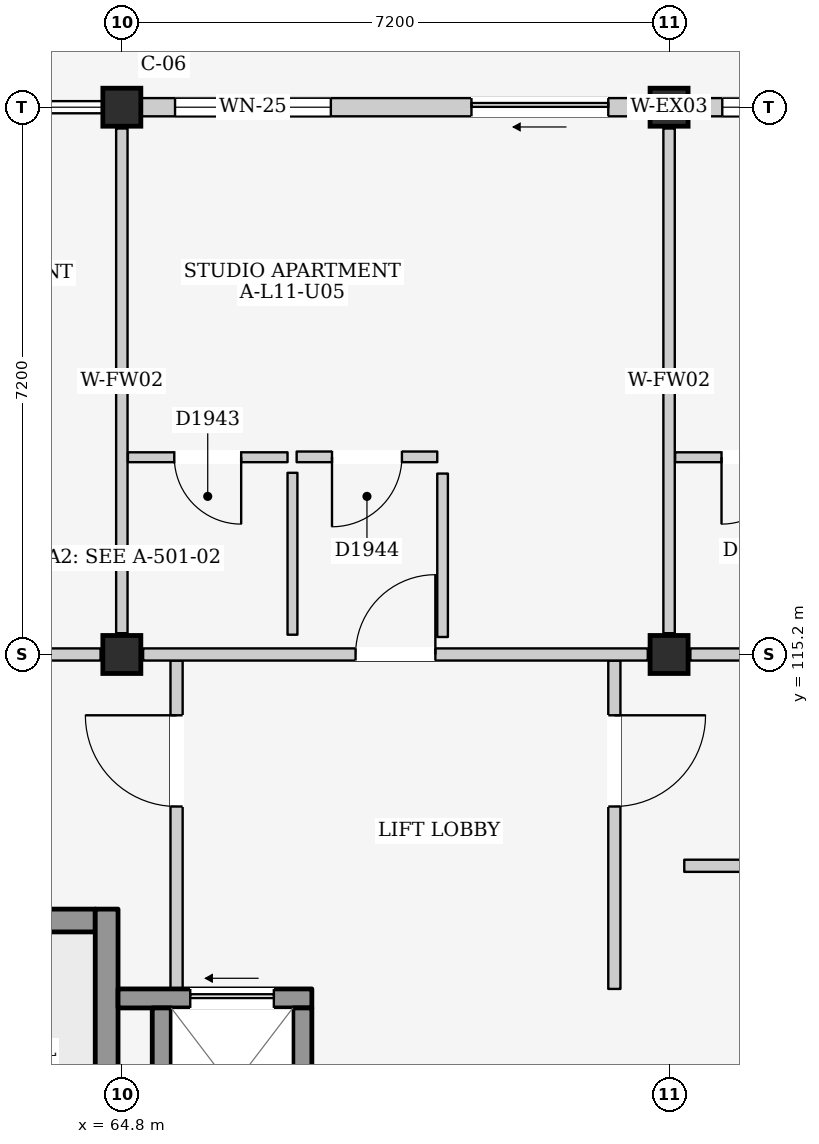
"""IFC4 building model, lengths in metres.
Left out: names, types, materials, properties, quantities, classifications, styles, units other than length and angle.
Written with IfcOpenShell. Run it as: python <this file> out.ifc"""

import sys

from ifc_helpers import new_model, si_unit, direction, frame, frame_2d, origin, origin_2d, place, context, subcontext, project, spatial, rectangle, extrude, element, fill, save


model = new_model("IFC4")
c1 = context("Model", 3, precision=1e-05, world=origin(), true_north=direction((0.0, 1.0)))
c2 = subcontext(c1, "Body", "Model", "MODEL_VIEW")
j1 = project(units=[si_unit("LENGTHUNIT", "METRE"), si_unit("PLANEANGLEUNIT", "RADIAN")], contexts=[c1])
p1 = place(None, origin())
s1 = spatial("IfcSite", under=j1, at=p1, CompositionType="ELEMENT")
p2 = place(p1, origin())
s2 = spatial("IfcBuilding", under=s1, at=p2, CompositionType="ELEMENT")
p3 = place(p2, frame((0.0, 0.0, 38.0)))
s3 = spatial("IfcBuildingStorey", under=s2, at=p3, CompositionType="ELEMENT", Elevation=38.0)
for number, where, z_axis, x_axis in (
    (1, (64.8, 115.2, 0.0), (0.0, 0.0, 1.0), (1.0, 0.0, 0.0)),
    (2, (64.8, 122.4, 0.0), (0.0, 0.0, 1.0), (1.0, 0.0, 0.0)),
    (3, (72.0, 115.2, 0.0), (0.0, 0.0, 1.0), (1.0, 0.0, 0.0)),
    (4, (72.0, 122.4, 0.0), (0.0, 0.0, 1.0), (1.0, 0.0, 0.0)),
):
    element("IfcColumn", number, at=place(p3, frame(where, z_axis=z_axis, x_axis=x_axis)), inside=s3, PredefinedType="COLUMN", context=c2, shape_type="SweptSolid", body=[
        extrude(rectangle(XDim=0.5, YDim=0.5, at=origin_2d()), origin(), (0.0, 0.0, 1.0), 3.2),
    ])
p4 = place(p3, frame((65.05, 122.4, 0.0), z_axis=(0.0, 0.0, 1.0), x_axis=(1.0, 0.0, 0.0)))
e5 = element("IfcWall", 5, at=p4, inside=s3, PredefinedType="ELEMENTEDWALL", context=c2, shape_type="SweptSolid", body=[
    extrude(rectangle(XDim=6.7, YDim=0.24, at=frame_2d((3.35, 0.0))), origin(), (0.0, 0.0, 1.0), 2.525),
])
p5 = place(p4, frame((4.35, 0.0, 0.0)))
e6 = element("IfcOpeningElement", 6, at=p5, cuts=e5, PredefinedType="OPENING", context=c2, shape_type="SweptSolid", body=[
    extrude(rectangle(XDim=1.8, YDim=2.12, at=frame_2d((0.9, 1.06))), frame((0.0, 0.135, 0.0), z_axis=(0.0, -1.0, 0.0), x_axis=(1.0, 0.0, 0.0)), (0.0, 0.0, 1.0), 0.27),
])
p6 = place(p4, frame((0.45, 0.0, 0.815)))
e7 = element("IfcOpeningElement", 7, at=p6, cuts=e5, PredefinedType="OPENING", context=c2, shape_type="SweptSolid", body=[
    extrude(rectangle(XDim=2.05, YDim=1.6, at=frame_2d((1.025, 0.8))), frame((0.0, 0.135, 0.0), z_axis=(0.0, -1.0, 0.0), x_axis=(1.0, 0.0, 0.0)), (0.0, 0.0, 1.0), 0.27),
])
p7 = place(p3, frame((72.25, 122.4, 0.0), z_axis=(0.0, 0.0, 1.0), x_axis=(1.0, 0.0, 0.0)))
e8 = element("IfcWall", 8, at=p7, inside=s3, PredefinedType="ELEMENTEDWALL", context=c2, shape_type="SweptSolid", body=[
    extrude(rectangle(XDim=6.7, YDim=0.24, at=frame_2d((3.35, 0.0))), origin(), (0.0, 0.0, 1.0), 2.525),
])
p8 = place(p7, frame((4.55, 0.0, 0.0)))
e9 = element("IfcOpeningElement", 9, at=p8, cuts=e8, PredefinedType="OPENING", context=c2, shape_type="SweptSolid", body=[
    extrude(rectangle(XDim=1.6, YDim=2.12, at=frame_2d((0.8, 1.06))), frame((0.0, 0.135, 0.0), z_axis=(0.0, -1.0, 0.0), x_axis=(1.0, 0.0, 0.0)), (0.0, 0.0, 1.0), 0.27),
])
p9 = place(p7, frame((0.45, 0.0, 0.865)))
e10 = element("IfcOpeningElement", 10, at=p9, cuts=e8, PredefinedType="OPENING", context=c2, shape_type="SweptSolid", body=[
    extrude(rectangle(XDim=1.75, YDim=1.55, at=frame_2d((0.875, 0.775))), frame((0.0, 0.135, 0.0), z_axis=(0.0, -1.0, 0.0), x_axis=(1.0, 0.0, 0.0)), (0.0, 0.0, 1.0), 0.27),
])
p10 = place(p3, frame((57.95, 111.7, 0.0), z_axis=(0.0, 0.0, 1.0), x_axis=(1.0, 0.0, 0.0)))
e11 = element("IfcWall", 11, at=p10, inside=s3, PredefinedType="SHEAR", context=c2, shape_type="SweptSolid", body=[
    extrude(rectangle(XDim=6.5, YDim=0.3, at=frame_2d((3.25, 0.0))), origin(), (0.0, 0.0, 1.0), 2.99),
])
p11 = place(p10, frame((0.18, 0.0, 0.0)))
e12 = element("IfcOpeningElement", 12, at=p11, cuts=e11, PredefinedType="OPENING", context=c2, shape_type="SweptSolid", body=[
    extrude(rectangle(XDim=1.15, YDim=2.2, at=frame_2d((0.575, 1.1))), frame((0.0, 0.165, 0.0), z_axis=(0.0, -1.0, 0.0), x_axis=(1.0, 0.0, 0.0)), (0.0, 0.0, 1.0), 0.33),
])
p12 = place(p3, frame((64.6, 108.15, 0.0), z_axis=(0.0, 0.0, 1.0), x_axis=(0.0, 1.0, 0.0)))
e13 = element("IfcWall", 13, at=p12, inside=s3, PredefinedType="SHEAR", context=c2, shape_type="SweptSolid", body=[
    extrude(rectangle(XDim=3.7, YDim=0.3, at=frame_2d((1.85, 0.0))), origin(), (0.0, 0.0, 1.0), 2.99),
])
p13 = place(p3, frame((65.52, 110.8, 0.0), z_axis=(0.0, 0.0, 1.0), x_axis=(0.0, 1.0, 0.0)))
e14 = element("IfcWall", 14, at=p13, inside=s3, PredefinedType="PARTITIONING", context=c2, shape_type="SweptSolid", body=[
    extrude(rectangle(XDim=4.32, YDim=0.16, at=frame_2d((2.16, 0.0))), origin(), (0.0, 0.0, 1.0), 2.99),
])
p14 = place(p13, frame((2.4, 0.0, 0.0)))
e15 = element("IfcOpeningElement", 15, at=p14, cuts=e14, PredefinedType="OPENING", context=c2, shape_type="SweptSolid", body=[
    extrude(rectangle(XDim=1.2, YDim=2.2, at=frame_2d((0.6, 1.1))), frame((0.0, 0.095, 0.0), z_axis=(0.0, -1.0, 0.0), x_axis=(1.0, 0.0, 0.0)), (0.0, 0.0, 1.0), 0.19),
])
p15 = place(p3, frame((71.28, 110.8, 0.0), z_axis=(0.0, 0.0, 1.0), x_axis=(0.0, 1.0, 0.0)))
e16 = element("IfcWall", 16, at=p15, inside=s3, PredefinedType="PARTITIONING", context=c2, shape_type="SweptSolid", body=[
    extrude(rectangle(XDim=4.32, YDim=0.16, at=frame_2d((2.16, 0.0))), origin(), (0.0, 0.0, 1.0), 2.99),
])
p16 = place(p15, frame((2.4, 0.0, 0.0)))
e17 = element("IfcOpeningElement", 17, at=p16, cuts=e16, PredefinedType="OPENING", context=c2, shape_type="SweptSolid", body=[
    extrude(rectangle(XDim=1.2, YDim=2.2, at=frame_2d((0.6, 1.1))), frame((0.0, 0.095, 0.0), z_axis=(0.0, -1.0, 0.0), x_axis=(1.0, 0.0, 0.0)), (0.0, 0.0, 1.0), 0.19),
])
p17 = place(p3, frame((64.75, 110.675, 0.0), z_axis=(0.0, 0.0, 1.0), x_axis=(1.0, 0.0, 0.0)))
e18 = element("IfcWall", 18, at=p17, inside=s3, PredefinedType="SHEAR", context=c2, shape_type="SweptSolid", body=[
    extrude(rectangle(XDim=2.55, YDim=0.25, at=frame_2d((1.275, 0.0))), origin(), (0.0, 0.0, 1.0), 2.99),
])
p18 = place(p17, frame((0.95, 0.0, 0.0)))
e19 = element("IfcOpeningElement", 19, at=p18, cuts=e18, PredefinedType="OPENING", context=c2, shape_type="SweptSolid", body=[
    extrude(rectangle(XDim=1.1, YDim=2.15, at=frame_2d((0.55, 1.075))), frame((0.0, 0.14, 0.0), z_axis=(0.0, -1.0, 0.0), x_axis=(1.0, 0.0, 0.0)), (0.0, 0.0, 1.0), 0.28),
])
for number, where, z_axis, x_axis in (
    (20, (65.325, 108.45, 0.0), (0.0, 0.0, 1.0), (0.0, 1.0, 0.0)),
    (21, (67.175, 108.45, 0.0), (0.0, 0.0, 1.0), (0.0, 1.0, 0.0)),
):
    element("IfcWall", number, at=place(p3, frame(where, z_axis=z_axis, x_axis=x_axis)), inside=s3, PredefinedType="SHEAR", context=c2, shape_type="SweptSolid", body=[
        extrude(rectangle(XDim=2.1, YDim=0.25, at=frame_2d((1.05, 0.0))), origin(), (0.0, 0.0, 1.0), 2.99),
    ])
p19 = place(p3, frame((57.88, 115.2, 0.0), z_axis=(0.0, 0.0, 1.0), x_axis=(1.0, 0.0, 0.0)))
e22 = element("IfcWall", 22, at=p19, inside=s3, PredefinedType="PARTITIONING", context=c2, shape_type="SweptSolid", body=[
    extrude(rectangle(XDim=6.64, YDim=0.16, at=frame_2d((3.32, 0.0))), origin(), (0.0, 0.0, 1.0), 2.325),
])
p20 = place(p19, frame((2.795, 0.0, 0.0)))
e23 = element("IfcOpeningElement", 23, at=p20, cuts=e22, PredefinedType="OPENING", context=c2, shape_type="SweptSolid", body=[
    extrude(rectangle(XDim=1.05, YDim=2.15, at=frame_2d((0.525, 1.075))), frame((0.0, 0.095, 0.0), z_axis=(0.0, -1.0, 0.0), x_axis=(1.0, 0.0, 0.0)), (0.0, 0.0, 1.0), 0.19),
])
p21 = place(p3, frame((64.8, 115.48, 0.0), z_axis=(0.0, 0.0, 1.0), x_axis=(0.0, 1.0, 0.0)))
e24 = element("IfcWall", 24, at=p21, inside=s3, PredefinedType="PARTITIONING", context=c2, shape_type="SweptSolid", body=[
    extrude(rectangle(XDim=6.64, YDim=0.15, at=frame_2d((3.32, 0.0))), origin(), (0.0, 0.0, 1.0), 2.475),
])
p22 = place(p3, frame((65.08, 115.2, 0.0), z_axis=(0.0, 0.0, 1.0), x_axis=(1.0, 0.0, 0.0)))
e25 = element("IfcWall", 25, at=p22, inside=s3, PredefinedType="PARTITIONING", context=c2, shape_type="SweptSolid", body=[
    extrude(rectangle(XDim=6.64, YDim=0.16, at=frame_2d((3.32, 0.0))), origin(), (0.0, 0.0, 1.0), 2.325),
])
p23 = place(p22, frame((2.795, 0.0, 0.0)))
e26 = element("IfcOpeningElement", 26, at=p23, cuts=e25, PredefinedType="OPENING", context=c2, shape_type="SweptSolid", body=[
    extrude(rectangle(XDim=1.05, YDim=2.15, at=frame_2d((0.525, 1.075))), frame((0.0, 0.095, 0.0), z_axis=(0.0, -1.0, 0.0), x_axis=(1.0, 0.0, 0.0)), (0.0, 0.0, 1.0), 0.19),
])
p24 = place(p3, frame((72.0, 115.48, 0.0), z_axis=(0.0, 0.0, 1.0), x_axis=(0.0, 1.0, 0.0)))
e27 = element("IfcWall", 27, at=p24, inside=s3, PredefinedType="PARTITIONING", context=c2, shape_type="SweptSolid", body=[
    extrude(rectangle(XDim=6.64, YDim=0.15, at=frame_2d((3.32, 0.0))), origin(), (0.0, 0.0, 1.0), 2.475),
])
p25 = place(p3, frame((64.88, 117.795, 0.0), z_axis=(0.0, 0.0, 1.0), x_axis=(1.0, 0.0, 0.0)))
e28 = element("IfcWall", 28, at=p25, inside=s3, PredefinedType="PARTITIONING", context=c2, shape_type="SweptSolid", body=[
    extrude(rectangle(XDim=2.1, YDim=0.13, at=frame_2d((1.05, 0.0))), origin(), (0.0, 0.0, 1.0), 2.99),
])
p26 = place(p25, frame((0.61, 0.0, 0.0)))
e29 = element("IfcOpeningElement", 29, at=p26, cuts=e28, PredefinedType="OPENING", context=c2, shape_type="SweptSolid", body=[
    extrude(rectangle(XDim=0.88, YDim=2.1, at=frame_2d((0.44, 1.05))), frame((0.0, 0.08, 0.0), z_axis=(0.0, -1.0, 0.0), x_axis=(1.0, 0.0, 0.0)), (0.0, 0.0, 1.0), 0.16),
])
p27 = place(p3, frame((67.045, 115.46, 0.0), z_axis=(0.0, 0.0, 1.0), x_axis=(0.0, 1.0, 0.0)))
e30 = element("IfcWall", 30, at=p27, inside=s3, PredefinedType="PARTITIONING", context=c2, shape_type="SweptSolid", body=[
    extrude(rectangle(XDim=2.13, YDim=0.13, at=frame_2d((1.065, 0.0))), origin(), (0.0, 0.0, 1.0), 2.99),
])
p28 = place(p3, frame((67.1, 117.8, 0.0), z_axis=(0.0, 0.0, 1.0), x_axis=(1.0, 0.0, 0.0)))
e31 = element("IfcWall", 31, at=p28, inside=s3, PredefinedType="PARTITIONING", context=c2, shape_type="SweptSolid", body=[
    extrude(rectangle(XDim=1.85, YDim=0.14, at=frame_2d((0.925, 0.0))), origin(), (0.0, 0.0, 1.0), 2.99),
])
p29 = place(p28, frame((0.465, 0.0, 0.0)))
e32 = element("IfcOpeningElement", 32, at=p29, cuts=e31, PredefinedType="OPENING", context=c2, shape_type="SweptSolid", body=[
    extrude(rectangle(XDim=0.92, YDim=2.1, at=frame_2d((0.46, 1.05))), frame((0.0, 0.085, 0.0), z_axis=(0.0, -1.0, 0.0), x_axis=(1.0, 0.0, 0.0)), (0.0, 0.0, 1.0), 0.17),
])
p30 = place(p3, frame((69.02, 115.43, 0.0), z_axis=(0.0, 0.0, 1.0), x_axis=(0.0, 1.0, 0.0)))
e33 = element("IfcWall", 33, at=p30, inside=s3, PredefinedType="PARTITIONING", context=c2, shape_type="SweptSolid", body=[
    extrude(rectangle(XDim=2.15, YDim=0.14, at=frame_2d((1.075, 0.0))), origin(), (0.0, 0.0, 1.0), 2.99),
])
p31 = place(p3, frame((72.28, 115.2, 0.0), z_axis=(0.0, 0.0, 1.0), x_axis=(1.0, 0.0, 0.0)))
e34 = element("IfcWall", 34, at=p31, inside=s3, PredefinedType="PARTITIONING", context=c2, shape_type="SweptSolid", body=[
    extrude(rectangle(XDim=6.64, YDim=0.16, at=frame_2d((3.32, 0.0))), origin(), (0.0, 0.0, 1.0), 2.325),
])
p32 = place(p31, frame((2.795, 0.0, 0.0)))
e35 = element("IfcOpeningElement", 35, at=p32, cuts=e34, PredefinedType="OPENING", context=c2, shape_type="SweptSolid", body=[
    extrude(rectangle(XDim=1.05, YDim=2.15, at=frame_2d((0.525, 1.075))), frame((0.0, 0.095, 0.0), z_axis=(0.0, -1.0, 0.0), x_axis=(1.0, 0.0, 0.0)), (0.0, 0.0, 1.0), 0.19),
])
p33 = place(p3, frame((72.08, 117.795, 0.0), z_axis=(0.0, 0.0, 1.0), x_axis=(1.0, 0.0, 0.0)))
e36 = element("IfcWall", 36, at=p33, inside=s3, PredefinedType="PARTITIONING", context=c2, shape_type="SweptSolid", body=[
    extrude(rectangle(XDim=2.1, YDim=0.13, at=frame_2d((1.05, 0.0))), origin(), (0.0, 0.0, 1.0), 2.99),
])
p34 = place(p33, frame((0.61, 0.0, 0.0)))
e37 = element("IfcOpeningElement", 37, at=p34, cuts=e36, PredefinedType="OPENING", context=c2, shape_type="SweptSolid", body=[
    extrude(rectangle(XDim=0.88, YDim=2.1, at=frame_2d((0.44, 1.05))), frame((0.0, 0.08, 0.0), z_axis=(0.0, -1.0, 0.0), x_axis=(1.0, 0.0, 0.0)), (0.0, 0.0, 1.0), 0.16),
])
p35 = place(p3, frame((72.2, 112.42, 0.0), z_axis=(0.0, 0.0, 1.0), x_axis=(1.0, 0.0, 0.0)))
e38 = element("IfcWall", 38, at=p35, inside=s3, PredefinedType="PARTITIONING", context=c2, shape_type="SweptSolid", body=[
    extrude(rectangle(XDim=6.8, YDim=0.16, at=frame_2d((3.4, 0.0))), origin(), (0.0, 0.0, 1.0), 2.99),
])
p36 = place(p35, frame((2.93, 0.0, 0.0)))
e39 = element("IfcOpeningElement", 39, at=p36, cuts=e38, PredefinedType="OPENING", context=c2, shape_type="SweptSolid", body=[
    extrude(rectangle(XDim=0.94, YDim=2.12, at=frame_2d((0.47, 1.06))), frame((0.0, 0.095, 0.0), z_axis=(0.0, -1.0, 0.0), x_axis=(1.0, 0.0, 0.0)), (0.0, 0.0, 1.0), 0.19),
])
p37 = place(p5, frame((1.8, 0.0, 0.0), z_axis=(0.0, 0.0, 1.0), x_axis=(-1.0, 0.0, 0.0)))
e40 = element("IfcDoor", 40, at=p37, inside=s3, OperationType="SLIDING_TO_LEFT", PredefinedType="DOOR", context=c2, shape_type="SweptSolid", body=[
    extrude(rectangle(XDim=1.8, YDim=2.12, at=frame_2d((0.9, 1.06))), frame((0.0, 0.025, 0.0), z_axis=(0.0, -1.0, 0.0), x_axis=(1.0, 0.0, 0.0)), (0.0, 0.0, 1.0), 0.05),
])
fill(e6, e40)
p38 = place(p6, origin())
e41 = element("IfcWindow", 41, at=p38, inside=s3, PartitioningType="DOUBLE_PANEL_VERTICAL", PredefinedType="WINDOW", context=c2, shape_type="SweptSolid", body=[
    extrude(rectangle(XDim=2.05, YDim=1.6, at=frame_2d((1.025, 0.8))), frame((0.0, 0.03, 0.0), z_axis=(0.0, -1.0, 0.0), x_axis=(1.0, 0.0, 0.0)), (0.0, 0.0, 1.0), 0.06),
])
fill(e7, e41)
p39 = place(p9, origin())
e42 = element("IfcWindow", 42, at=p39, inside=s3, PartitioningType="DOUBLE_PANEL_VERTICAL", PredefinedType="WINDOW", context=c2, shape_type="SweptSolid", body=[
    extrude(rectangle(XDim=1.75, YDim=1.55, at=frame_2d((0.875, 0.775))), frame((0.0, 0.03, 0.0), z_axis=(0.0, -1.0, 0.0), x_axis=(1.0, 0.0, 0.0)), (0.0, 0.0, 1.0), 0.06),
])
fill(e10, e42)
p40 = place(p14, origin())
e43 = element("IfcDoor", 43, at=p40, inside=s3, OperationType="SINGLE_SWING_RIGHT", PredefinedType="DOOR", context=c2, shape_type="SweptSolid", body=[
    extrude(rectangle(XDim=1.2, YDim=2.2, at=frame_2d((0.6, 1.1))), frame((0.0, 0.025, 0.0), z_axis=(0.0, -1.0, 0.0), x_axis=(1.0, 0.0, 0.0)), (0.0, 0.0, 1.0), 0.05),
])
fill(e15, e43)
p41 = place(p16, frame((1.2, 0.0, 0.0), z_axis=(0.0, 0.0, 1.0), x_axis=(-1.0, 0.0, 0.0)))
e44 = element("IfcDoor", 44, at=p41, inside=s3, OperationType="SINGLE_SWING_LEFT", PredefinedType="DOOR", context=c2, shape_type="SweptSolid", body=[
    extrude(rectangle(XDim=1.2, YDim=2.2, at=frame_2d((0.6, 1.1))), frame((0.0, 0.025, 0.0), z_axis=(0.0, -1.0, 0.0), x_axis=(1.0, 0.0, 0.0)), (0.0, 0.0, 1.0), 0.05),
])
fill(e17, e44)
p42 = place(p18, origin())
e45 = element("IfcDoor", 45, at=p42, inside=s3, OperationType="SLIDING_TO_LEFT", PredefinedType="DOOR", context=c2, shape_type="SweptSolid", body=[
    extrude(rectangle(XDim=1.1, YDim=2.15, at=frame_2d((0.55, 1.075))), frame((0.0, 0.025, 0.0), z_axis=(0.0, -1.0, 0.0), x_axis=(1.0, 0.0, 0.0)), (0.0, 0.0, 1.0), 0.05),
])
fill(e19, e45)
p43 = place(p23, origin())
e46 = element("IfcDoor", 46, at=p43, inside=s3, OperationType="SINGLE_SWING_RIGHT", PredefinedType="DOOR", context=c2, shape_type="SweptSolid", body=[
    extrude(rectangle(XDim=1.05, YDim=2.15, at=frame_2d((0.525, 1.075))), frame((0.0, 0.025, 0.0), z_axis=(0.0, -1.0, 0.0), x_axis=(1.0, 0.0, 0.0)), (0.0, 0.0, 1.0), 0.05),
])
fill(e26, e46)
p44 = place(p26, frame((0.88, 0.0, 0.0), z_axis=(0.0, 0.0, 1.0), x_axis=(-1.0, 0.0, 0.0)))
e47 = element("IfcDoor", 47, at=p44, inside=s3, OperationType="SINGLE_SWING_LEFT", PredefinedType="DOOR", context=c2, shape_type="SweptSolid", body=[
    extrude(rectangle(XDim=0.88, YDim=2.1, at=frame_2d((0.44, 1.05))), frame((0.0, 0.025, 0.0), z_axis=(0.0, -1.0, 0.0), x_axis=(1.0, 0.0, 0.0)), (0.0, 0.0, 1.0), 0.05),
])
fill(e29, e47)
p45 = place(p29, frame((0.92, 0.0, 0.0), z_axis=(0.0, 0.0, 1.0), x_axis=(-1.0, 0.0, 0.0)))
e48 = element("IfcDoor", 48, at=p45, inside=s3, OperationType="SINGLE_SWING_RIGHT", PredefinedType="DOOR", context=c2, shape_type="SweptSolid", body=[
    extrude(rectangle(XDim=0.92, YDim=2.1, at=frame_2d((0.46, 1.05))), frame((0.0, 0.025, 0.0), z_axis=(0.0, -1.0, 0.0), x_axis=(1.0, 0.0, 0.0)), (0.0, 0.0, 1.0), 0.05),
])
fill(e32, e48)
p46 = place(p34, frame((0.88, 0.0, 0.0), z_axis=(0.0, 0.0, 1.0), x_axis=(-1.0, 0.0, 0.0)))
e49 = element("IfcDoor", 49, at=p46, inside=s3, OperationType="SINGLE_SWING_RIGHT", PredefinedType="DOOR", context=c2, shape_type="SweptSolid", body=[
    extrude(rectangle(XDim=0.88, YDim=2.1, at=frame_2d((0.44, 1.05))), frame((0.0, 0.025, 0.0), z_axis=(0.0, -1.0, 0.0), x_axis=(1.0, 0.0, 0.0)), (0.0, 0.0, 1.0), 0.05),
])
fill(e37, e49)
save(model, sys.argv[1])
